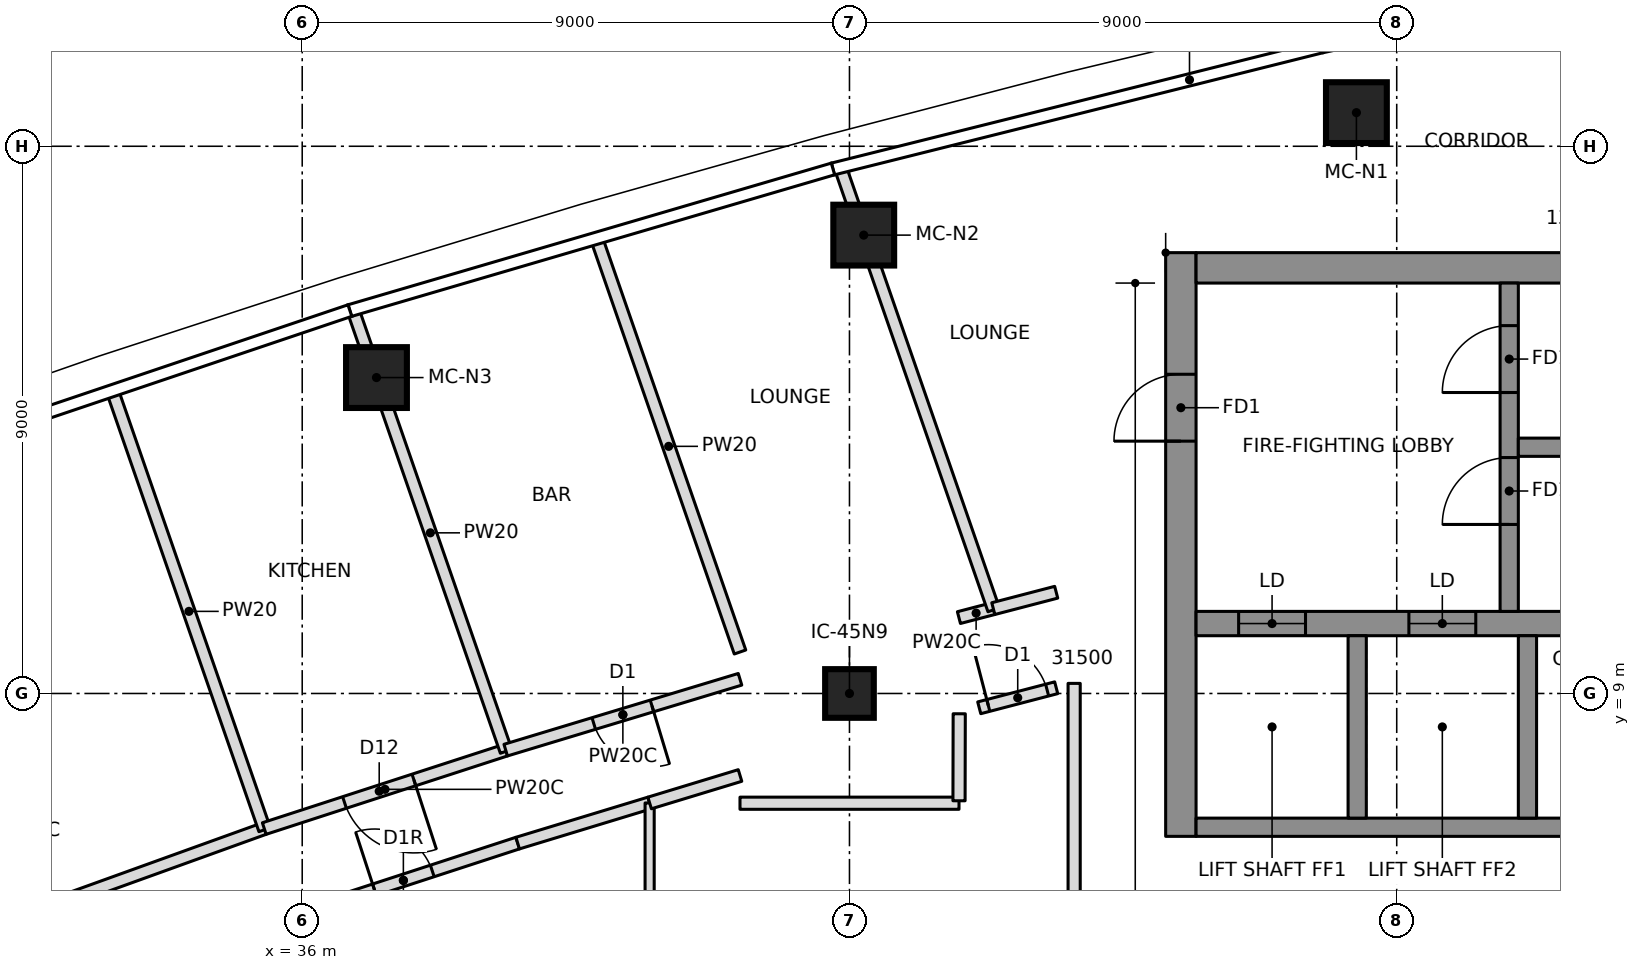
"""IFC4 building model, lengths in metres.
Left out: names, types, materials, properties, quantities, classifications, styles, units other than length and angle.
Written with IfcOpenShell. Run it as: python <this file> out.ifc"""

import sys

from ifc_helpers import new_model, si_unit, direction, frame, frame_2d, origin, origin_2d, place, context, subcontext, project, spatial, polyline, rectangle, outline, extrude, element, fill, save


model = new_model("IFC4")
c1 = context("Model", 3, precision=1e-05, world=origin(), true_north=direction((0.0, 1.0)))
c2 = subcontext(c1, "Body", "Model", "MODEL_VIEW")
j1 = project(units=[si_unit("LENGTHUNIT", "METRE"), si_unit("PLANEANGLEUNIT", "RADIAN")], contexts=[c1])
p1 = place(None, origin())
s1 = spatial("IfcSite", under=j1, at=p1, CompositionType="ELEMENT")
p2 = place(p1, origin())
s2 = spatial("IfcBuilding", under=s1, at=p2, CompositionType="ELEMENT")
p3 = place(p2, frame((0.0, 0.0, 313.2)))
s3 = spatial("IfcBuildingStorey", under=s2, at=p3, CompositionType="ELEMENT", Elevation=313.2)
p4 = place(p3, frame((50.45, 6.65, 0.0), z_axis=(0.0, 0.0, 1.0), x_axis=(0.0, 1.0, 0.0)))
e1 = element("IfcWall", 1, at=p4, inside=s3, PredefinedType="SHEAR", context=c2, shape_type="SweptSolid", body=[
    extrude(rectangle(XDim=9.6, YDim=0.5, at=frame_2d((4.8, 0.0))), origin(), (0.0, 0.0, 1.0), 5.4),
])
p5 = place(p4, frame((6.5, 0.0, 0.0)))
e2 = element("IfcOpeningElement", 2, at=p5, cuts=e1, PredefinedType="OPENING", context=c2, shape_type="SweptSolid", body=[
    extrude(rectangle(XDim=1.1, YDim=2.1, at=frame_2d((0.55, 1.05))), frame((0.0, 0.26, 0.0), z_axis=(0.0, -1.0, 0.0), x_axis=(1.0, 0.0, 0.0)), (0.0, 0.0, 1.0), 0.52),
])
p6 = place(p3, frame((50.7, 16.0, 0.0), z_axis=(0.0, 0.0, 1.0), x_axis=(1.0, 0.0, 0.0)))
e3 = element("IfcWall", 3, at=p6, inside=s3, PredefinedType="SHEAR", context=c2, shape_type="SweptSolid", body=[
    extrude(rectangle(XDim=13.52, YDim=0.5, at=frame_2d((6.76, 0.0))), origin(), (0.0, 0.0, 1.0), 5.4),
])
p7 = place(p3, frame((50.7, 10.15, 0.0), z_axis=(0.0, 0.0, 1.0), x_axis=(1.0, 0.0, 0.0)))
e4 = element("IfcWall", 4, at=p7, inside=s3, PredefinedType="SHEAR", context=c2, shape_type="SweptSolid", body=[
    extrude(rectangle(XDim=13.02, YDim=0.4, at=frame_2d((6.51, 0.0))), origin(), (0.0, 0.0, 1.0), 5.4),
])
p8 = place(p7, frame((0.7, 0.0, 0.0)))
e5 = element("IfcOpeningElement", 5, at=p8, cuts=e4, PredefinedType="OPENING", context=c2, shape_type="SweptSolid", body=[
    extrude(rectangle(XDim=1.1, YDim=2.1, at=frame_2d((0.55, 1.05))), frame((0.0, 0.21, 0.0), z_axis=(0.0, -1.0, 0.0), x_axis=(1.0, 0.0, 0.0)), (0.0, 0.0, 1.0), 0.42),
])
p9 = place(p7, frame((3.5, 0.0, 0.0)))
e6 = element("IfcOpeningElement", 6, at=p9, cuts=e4, PredefinedType="OPENING", context=c2, shape_type="SweptSolid", body=[
    extrude(rectangle(XDim=1.1, YDim=2.1, at=frame_2d((0.55, 1.05))), frame((0.0, 0.21, 0.0), z_axis=(0.0, -1.0, 0.0), x_axis=(1.0, 0.0, 0.0)), (0.0, 0.0, 1.0), 0.42),
])
p10 = place(p3, frame((50.7, 6.8, 0.0), z_axis=(0.0, 0.0, 1.0), x_axis=(1.0, 0.0, 0.0)))
e7 = element("IfcWall", 7, at=p10, inside=s3, PredefinedType="SHEAR", context=c2, shape_type="SweptSolid", body=[
    extrude(rectangle(XDim=10.9, YDim=0.3, at=frame_2d((5.45, 0.0))), origin(), (0.0, 0.0, 1.0), 5.4),
])
p11 = place(p10, frame((6.4, 0.0, 0.0)))
e8 = element("IfcOpeningElement", 8, at=p11, cuts=e7, PredefinedType="OPENING", context=c2, shape_type="SweptSolid", body=[
    extrude(rectangle(XDim=0.9, YDim=2.1, at=frame_2d((0.45, 1.05))), frame((0.0, 0.16, 0.0), z_axis=(0.0, -1.0, 0.0), x_axis=(1.0, 0.0, 0.0)), (0.0, 0.0, 1.0), 0.32),
])
p12 = place(p10, frame((9.2, 0.0, 0.0)))
e9 = element("IfcOpeningElement", 9, at=p12, cuts=e7, PredefinedType="OPENING", context=c2, shape_type="SweptSolid", body=[
    extrude(rectangle(XDim=0.9, YDim=2.1, at=frame_2d((0.45, 1.05))), frame((0.0, 0.16, 0.0), z_axis=(0.0, -1.0, 0.0), x_axis=(1.0, 0.0, 0.0)), (0.0, 0.0, 1.0), 0.32),
])
for number, where, z_axis, x_axis in (
    (10, (53.35, 6.95, 0.0), (0.0, 0.0, 1.0), (0.0, 1.0, 0.0)),
    (11, (56.15, 6.95, 0.0), (0.0, 0.0, 1.0), (0.0, 1.0, 0.0)),
):
    element("IfcWall", number, at=place(p3, frame(where, z_axis=z_axis, x_axis=x_axis)), inside=s3, PredefinedType="SHEAR", context=c2, shape_type="SweptSolid", body=[
        extrude(rectangle(XDim=3.0, YDim=0.3, at=frame_2d((1.5, 0.0))), origin(), (0.0, 0.0, 1.0), 5.4),
    ])
p13 = place(p3, frame((55.85, 10.35, 0.0), z_axis=(0.0, 0.0, 1.0), x_axis=(0.0, 1.0, 0.0)))
e12 = element("IfcWall", 12, at=p13, inside=s3, PredefinedType="SHEAR", context=c2, shape_type="SweptSolid", body=[
    extrude(rectangle(XDim=5.4, YDim=0.3, at=frame_2d((2.7, 0.0))), origin(), (0.0, 0.0, 1.0), 5.4),
])
p14 = place(p13, frame((1.43, 0.0, 0.0)))
e13 = element("IfcOpeningElement", 13, at=p14, cuts=e12, PredefinedType="OPENING", context=c2, shape_type="SweptSolid", body=[
    extrude(rectangle(XDim=1.1, YDim=2.1, at=frame_2d((0.55, 1.05))), frame((0.0, 0.16, 0.0), z_axis=(0.0, -1.0, 0.0), x_axis=(1.0, 0.0, 0.0)), (0.0, 0.0, 1.0), 0.32),
])
p15 = place(p13, frame((3.6, 0.0, 0.0)))
e14 = element("IfcOpeningElement", 14, at=p15, cuts=e12, PredefinedType="OPENING", context=c2, shape_type="SweptSolid", body=[
    extrude(rectangle(XDim=1.1, YDim=2.1, at=frame_2d((0.55, 1.05))), frame((0.0, 0.16, 0.0), z_axis=(0.0, -1.0, 0.0), x_axis=(1.0, 0.0, 0.0)), (0.0, 0.0, 1.0), 0.32),
])
p16 = place(p3, frame((56.0, 13.05, 0.0), z_axis=(0.0, 0.0, 1.0), x_axis=(1.0, 0.0, 0.0)))
e15 = element("IfcWall", 15, at=p16, inside=s3, PredefinedType="SHEAR", context=c2, shape_type="SweptSolid", body=[
    extrude(rectangle(XDim=7.72, YDim=0.3, at=frame_2d((3.86, 0.0))), origin(), (0.0, 0.0, 1.0), 5.4),
])
for number, where, z_axis, x_axis in (
    (16, (53.337, 18.553, 0.0), (0.0, 0.0, 1.0), (1.0, 0.0, 0.0)),
    (17, (45.235, 16.539, 0.0), (0.0, 0.0, 1.0), (1.0, 0.0, 0.0)),
    (18, (37.221, 14.196, 0.0), (0.0, 0.0, 1.0), (1.0, 0.0, 0.0)),
):
    element("IfcColumn", number, at=place(p3, frame(where, z_axis=z_axis, x_axis=x_axis)), inside=s3, PredefinedType="COLUMN", context=c2, shape_type="SweptSolid", body=[
        extrude(rectangle(XDim=1.0, YDim=1.0, at=origin_2d()), origin(), (0.0, 0.0, 1.0), 5.4),
    ])
p17 = place(p3, frame((45.0, 9.0, 0.0), z_axis=(0.0, 0.0, 1.0), x_axis=(1.0, 0.0, 0.0)))
e19 = element("IfcColumn", 19, at=p17, inside=s3, PredefinedType="COLUMN", context=c2, shape_type="SweptSolid", body=[
    extrude(rectangle(XDim=0.8, YDim=0.8, at=origin_2d()), origin(), (0.0, 0.0, 1.0), 5.4),
])
p18 = place(p3, frame((56.785, 20.615, 0.0), z_axis=(0.0, 0.0, 1.0), x_axis=(-0.977020225348, -0.213146614471, 0.0)))
e20 = element("IfcWall", 20, at=p18, inside=s3, PredefinedType="NOTDEFINED", context=c2, shape_type="SweptSolid", body=[
    extrude(outline(polyline([(-0.029, -0.2), (4.142, -0.2), (4.142, 0.2), (0.029, 0.2), (-0.029, -0.2)])), origin(), (0.0, 0.0, 1.0), 5.1),
])
p19 = place(p18, frame((0.871, 0.0, 0.3)))
e21 = element("IfcOpeningElement", 21, at=p19, cuts=e20, PredefinedType="OPENING", context=c2, shape_type="SweptSolid", body=[
    extrude(rectangle(XDim=2.4, YDim=3.0, at=frame_2d((1.2, 1.5))), frame((0.0, 0.21, 0.0), z_axis=(0.0, -1.0, 0.0), x_axis=(1.0, 0.0, 0.0)), (0.0, 0.0, 1.0), 0.42),
])
p20 = place(p3, frame((35.376, 6.779, 0.0), z_axis=(0.0, 0.0, 1.0), x_axis=(-0.940653782276, -0.339367738433, 0.0)))
e22 = element("IfcWall", 22, at=p20, inside=s3, PredefinedType="PARTITIONING", context=c2, shape_type="SweptSolid", body=[
    extrude(rectangle(XDim=8.347, YDim=0.2, at=frame_2d((4.174, 0.0))), origin(), (0.0, 0.0, 1.0), 5.1),
])
p21 = place(p20, frame((3.674, 0.0, 0.0)))
e23 = element("IfcOpeningElement", 23, at=p21, cuts=e22, PredefinedType="OPENING", context=c2, shape_type="SweptSolid", body=[
    extrude(rectangle(XDim=2.0, YDim=2.4, at=frame_2d((1.0, 1.2))), frame((0.0, 0.11, 0.0), z_axis=(0.0, -1.0, 0.0), x_axis=(1.0, 0.0, 0.0)), (0.0, 0.0, 1.0), 0.22),
])
p22 = place(p3, frame((35.382, 6.76, 0.0), z_axis=(0.0, 0.0, 1.0), x_axis=(-0.327699570064, 0.944781981083, 0.0)))
e24 = element("IfcWall", 24, at=p22, inside=s3, PredefinedType="PARTITIONING", context=c2, shape_type="SweptSolid", body=[
    extrude(rectangle(XDim=7.601, YDim=0.2, at=frame_2d((3.801, 0.0))), origin(), (0.0, 0.0, 1.0), 5.1),
])
p23 = place(p3, frame((39.347, 8.068, 0.0), z_axis=(0.0, 0.0, 1.0), x_axis=(-0.951104948213, -0.308867896493, 0.0)))
e25 = element("IfcWall", 25, at=p23, inside=s3, PredefinedType="PARTITIONING", context=c2, shape_type="SweptSolid", body=[
    extrude(rectangle(XDim=4.175, YDim=0.2, at=frame_2d((2.087, 0.0))), origin(), (0.0, 0.0, 1.0), 5.1),
])
p24 = place(p23, frame((1.588, 0.0, 0.0)))
e26 = element("IfcOpeningElement", 26, at=p24, cuts=e25, PredefinedType="OPENING", context=c2, shape_type="SweptSolid", body=[
    extrude(rectangle(XDim=1.2, YDim=2.1, at=frame_2d((0.6, 1.05))), frame((0.0, 0.11, 0.0), z_axis=(0.0, -1.0, 0.0), x_axis=(1.0, 0.0, 0.0)), (0.0, 0.0, 1.0), 0.22),
])
p25 = place(p3, frame((39.354, 8.049, 0.0), z_axis=(0.0, 0.0, 1.0), x_axis=(-0.327741126954, 0.944767565967, 0.0)))
e27 = element("IfcWall", 27, at=p25, inside=s3, PredefinedType="PARTITIONING", context=c2, shape_type="SweptSolid", body=[
    extrude(rectangle(XDim=7.606, YDim=0.2, at=frame_2d((3.803, 0.0))), origin(), (0.0, 0.0, 1.0), 5.1),
])
p26 = place(p3, frame((43.2, 9.233, 0.0), z_axis=(0.0, 0.0, 1.0), x_axis=(-0.957187982889, -0.289467036833, 0.0)))
e28 = element("IfcWall", 28, at=p26, inside=s3, PredefinedType="PARTITIONING", context=c2, shape_type="SweptSolid", body=[
    extrude(rectangle(XDim=4.026, YDim=0.2, at=frame_2d((2.013, 0.0))), origin(), (0.0, 0.0, 1.0), 5.1),
])
p27 = place(p26, frame((1.513, 0.0, 0.0)))
e29 = element("IfcOpeningElement", 29, at=p27, cuts=e28, PredefinedType="OPENING", context=c2, shape_type="SweptSolid", body=[
    extrude(rectangle(XDim=1.0, YDim=2.1, at=frame_2d((0.5, 1.05))), frame((0.0, 0.11, 0.0), z_axis=(0.0, -1.0, 0.0), x_axis=(1.0, 0.0, 0.0)), (0.0, 0.0, 1.0), 0.22),
])
p28 = place(p3, frame((43.2, 9.682, 0.0), z_axis=(0.0, 0.0, 1.0), x_axis=(-0.327701896972, 0.944781173987, 0.0)))
e30 = element("IfcWall", 30, at=p28, inside=s3, PredefinedType="PARTITIONING", context=c2, shape_type="SweptSolid", body=[
    extrude(rectangle(XDim=7.16, YDim=0.2, at=frame_2d((3.58, 0.0))), origin(), (0.0, 0.0, 1.0), 5.1),
])
p29 = place(p3, frame((47.365, 10.396, 0.0), z_axis=(0.0, 0.0, 1.0), x_axis=(-0.967635017449, -0.252353864654, 0.0)))
e31 = element("IfcWall", 31, at=p29, inside=s3, PredefinedType="PARTITIONING", context=c2, shape_type="SweptSolid", body=[
    extrude(rectangle(XDim=0.584, YDim=0.2, at=frame_2d((0.292, 0.0))), origin(), (0.0, 0.0, 1.0), 5.1),
])
p30 = place(p3, frame((47.372, 10.376, 0.0), z_axis=(0.0, 0.0, 1.0), x_axis=(-0.327733034973, 0.944770373047, 0.0)))
e32 = element("IfcWall", 32, at=p30, inside=s3, PredefinedType="PARTITIONING", context=c2, shape_type="SweptSolid", body=[
    extrude(rectangle(XDim=7.624, YDim=0.2, at=frame_2d((3.812, 0.0))), origin(), (0.0, 0.0, 1.0), 5.1),
])
p31 = place(p3, frame((35.783, 5.313, 0.0), z_axis=(0.0, 0.0, 1.0), x_axis=(0.950700567571, 0.310110352648, 0.0)))
e33 = element("IfcWall", 33, at=p31, inside=s3, PredefinedType="PARTITIONING", context=c2, shape_type="SweptSolid", body=[
    extrude(rectangle(XDim=3.955, YDim=0.2, at=frame_2d((1.978, 0.0))), origin(), (0.0, 0.0, 1.0), 5.1),
])
p32 = place(p31, frame((1.478, 0.0, 0.0)))
e34 = element("IfcOpeningElement", 34, at=p32, cuts=e33, PredefinedType="OPENING", context=c2, shape_type="SweptSolid", body=[
    extrude(rectangle(XDim=1.0, YDim=2.1, at=frame_2d((0.5, 1.05))), frame((0.0, 0.11, 0.0), z_axis=(0.0, -1.0, 0.0), x_axis=(1.0, 0.0, 0.0)), (0.0, 0.0, 1.0), 0.22),
])
p33 = place(p3, frame((39.544, 6.539, 0.0), z_axis=(0.0, 0.0, 1.0), x_axis=(0.956735130354, 0.290960289981, 0.0)))
e35 = element("IfcWall", 35, at=p33, inside=s3, PredefinedType="PARTITIONING", context=c2, shape_type="SweptSolid", body=[
    extrude(rectangle(XDim=2.268, YDim=0.2, at=frame_2d((1.134, 0.0))), origin(), (0.0, 0.0, 1.0), 5.1),
])
p34 = place(p3, frame((41.714, -7.199, 0.0), z_axis=(0.0, 0.0, 1.0), x_axis=(0.0, 1.0, 0.0)))
e36 = element("IfcWall", 36, at=p34, inside=s3, PredefinedType="PARTITIONING", context=c2, shape_type="SweptSolid", body=[
    extrude(rectangle(XDim=14.398, YDim=0.15, at=frame_2d((7.199, 0.0))), origin(), (0.0, 0.0, 1.0), 5.1),
])
p35 = place(p3, frame((41.714, 7.199, 0.0), z_axis=(0.0, 0.0, 1.0), x_axis=(0.956755682532, 0.290892701769, 0.0)))
e37 = element("IfcWall", 37, at=p35, inside=s3, PredefinedType="PARTITIONING", context=c2, shape_type="SweptSolid", body=[
    extrude(rectangle(XDim=1.553, YDim=0.2, at=frame_2d((0.777, 0.0))), origin(), (0.0, 0.0, 1.0), 5.1),
])
p36 = place(p3, frame((48.4, 10.665, 0.0), z_axis=(0.0, 0.0, 1.0), x_axis=(-0.967689993731, -0.252142967448, 0.0)))
e38 = element("IfcWall", 38, at=p36, inside=s3, PredefinedType="PARTITIONING", context=c2, shape_type="SweptSolid", body=[
    extrude(rectangle(XDim=1.069, YDim=0.2, at=frame_2d((0.534, 0.0))), origin(), (0.0, 0.0, 1.0), 5.1),
])
p37 = place(p3, frame((47.134, 8.764, 0.0), z_axis=(0.0, 0.0, 1.0), x_axis=(0.967678694968, 0.252186326563, 0.0)))
e39 = element("IfcWall", 39, at=p37, inside=s3, PredefinedType="PARTITIONING", context=c2, shape_type="SweptSolid", body=[
    extrude(rectangle(XDim=1.308, YDim=0.2, at=frame_2d((0.654, 0.0))), origin(), (0.0, 0.0, 1.0), 5.1),
])
p38 = place(p37, frame((0.154, 0.0, 0.0)))
e40 = element("IfcOpeningElement", 40, at=p38, cuts=e39, PredefinedType="OPENING", context=c2, shape_type="SweptSolid", body=[
    extrude(rectangle(XDim=1.0, YDim=2.1, at=frame_2d((0.5, 1.05))), frame((0.0, 0.11, 0.0), z_axis=(0.0, -1.0, 0.0), x_axis=(1.0, 0.0, 0.0)), (0.0, 0.0, 1.0), 0.22),
])
p39 = place(p3, frame((43.199, 7.195, 0.0), z_axis=(0.0, 0.0, 1.0), x_axis=(0.999999997703, 6.7778229e-05, 0.0)))
e41 = element("IfcWall", 41, at=p39, inside=s3, PredefinedType="PARTITIONING", context=c2, shape_type="SweptSolid", body=[
    extrude(rectangle(XDim=3.602, YDim=0.2, at=frame_2d((1.801, 0.0))), origin(), (0.0, 0.0, 1.0), 5.1),
])
p40 = place(p3, frame((46.802, 7.235, 0.0), z_axis=(0.0, 0.0, 1.0), x_axis=(0.00238825658, 0.999997148111, 0.0)))
e42 = element("IfcWall", 42, at=p40, inside=s3, PredefinedType="PARTITIONING", context=c2, shape_type="SweptSolid", body=[
    extrude(rectangle(XDim=1.431, YDim=0.2, at=frame_2d((0.716, 0.0))), origin(), (0.0, 0.0, 1.0), 5.1),
])
p41 = place(p3, frame((48.695, 9.166, 0.0), z_axis=(0.0, 0.0, 1.0), x_axis=(0.0, -1.0, 0.0)))
e43 = element("IfcWall", 43, at=p41, inside=s3, PredefinedType="PARTITIONING", context=c2, shape_type="SweptSolid", body=[
    extrude(rectangle(XDim=18.332, YDim=0.2, at=frame_2d((9.166, 0.0))), origin(), (0.0, 0.0, 1.0), 5.1),
])
p42 = place(p24, origin())
e44 = element("IfcDoor", 44, at=p42, inside=s3, OperationType="SINGLE_SWING_RIGHT", PredefinedType="DOOR", context=c2, shape_type="SweptSolid", body=[
    extrude(rectangle(XDim=1.2, YDim=2.1, at=frame_2d((0.6, 1.05))), frame((0.0, 0.025, 0.0), z_axis=(0.0, -1.0, 0.0), x_axis=(1.0, 0.0, 0.0)), (0.0, 0.0, 1.0), 0.05),
])
fill(e26, e44)
p43 = place(p27, origin())
e45 = element("IfcDoor", 45, at=p43, inside=s3, OperationType="SINGLE_SWING_LEFT", PredefinedType="DOOR", context=c2, shape_type="SweptSolid", body=[
    extrude(rectangle(XDim=1.0, YDim=2.1, at=frame_2d((0.5, 1.05))), frame((0.0, 0.025, 0.0), z_axis=(0.0, -1.0, 0.0), x_axis=(1.0, 0.0, 0.0)), (0.0, 0.0, 1.0), 0.05),
])
fill(e29, e45)
p44 = place(p32, origin())
e46 = element("IfcDoor", 46, at=p44, inside=s3, OperationType="SINGLE_SWING_RIGHT", PredefinedType="DOOR", context=c2, shape_type="SweptSolid", body=[
    extrude(rectangle(XDim=1.0, YDim=2.1, at=frame_2d((0.5, 1.05))), frame((0.0, 0.025, 0.0), z_axis=(0.0, -1.0, 0.0), x_axis=(1.0, 0.0, 0.0)), (0.0, 0.0, 1.0), 0.05),
])
fill(e34, e46)
p45 = place(p38, origin())
e47 = element("IfcDoor", 47, at=p45, inside=s3, OperationType="SINGLE_SWING_LEFT", PredefinedType="DOOR", context=c2, shape_type="SweptSolid", body=[
    extrude(rectangle(XDim=1.0, YDim=2.1, at=frame_2d((0.5, 1.05))), frame((0.0, 0.025, 0.0), z_axis=(0.0, -1.0, 0.0), x_axis=(1.0, 0.0, 0.0)), (0.0, 0.0, 1.0), 0.05),
])
fill(e40, e47)
p46 = place(p8, origin())
e48 = element("IfcDoor", 48, at=p46, inside=s3, OperationType="DOUBLE_DOOR_SLIDING", PredefinedType="DOOR", context=c2, shape_type="SweptSolid", body=[
    extrude(rectangle(XDim=1.1, YDim=2.1, at=frame_2d((0.55, 1.05))), frame((0.0, 0.025, 0.0), z_axis=(0.0, -1.0, 0.0), x_axis=(1.0, 0.0, 0.0)), (0.0, 0.0, 1.0), 0.05),
])
fill(e5, e48)
p47 = place(p9, origin())
e49 = element("IfcDoor", 49, at=p47, inside=s3, OperationType="DOUBLE_DOOR_SLIDING", PredefinedType="DOOR", context=c2, shape_type="SweptSolid", body=[
    extrude(rectangle(XDim=1.1, YDim=2.1, at=frame_2d((0.55, 1.05))), frame((0.0, 0.025, 0.0), z_axis=(0.0, -1.0, 0.0), x_axis=(1.0, 0.0, 0.0)), (0.0, 0.0, 1.0), 0.05),
])
fill(e6, e49)
p48 = place(p14, origin())
e50 = element("IfcDoor", 50, at=p48, inside=s3, OperationType="SINGLE_SWING_RIGHT", PredefinedType="DOOR", context=c2, shape_type="SweptSolid", body=[
    extrude(rectangle(XDim=1.1, YDim=2.1, at=frame_2d((0.55, 1.05))), frame((0.0, 0.025, 0.0), z_axis=(0.0, -1.0, 0.0), x_axis=(1.0, 0.0, 0.0)), (0.0, 0.0, 1.0), 0.05),
])
fill(e13, e50)
p49 = place(p15, origin())
e51 = element("IfcDoor", 51, at=p49, inside=s3, OperationType="SINGLE_SWING_RIGHT", PredefinedType="DOOR", context=c2, shape_type="SweptSolid", body=[
    extrude(rectangle(XDim=1.1, YDim=2.1, at=frame_2d((0.55, 1.05))), frame((0.0, 0.025, 0.0), z_axis=(0.0, -1.0, 0.0), x_axis=(1.0, 0.0, 0.0)), (0.0, 0.0, 1.0), 0.05),
])
fill(e14, e51)
p50 = place(p5, origin())
e52 = element("IfcDoor", 52, at=p50, inside=s3, OperationType="SINGLE_SWING_RIGHT", PredefinedType="DOOR", context=c2, shape_type="SweptSolid", body=[
    extrude(rectangle(XDim=1.1, YDim=2.1, at=frame_2d((0.55, 1.05))), frame((0.0, 0.025, 0.0), z_axis=(0.0, -1.0, 0.0), x_axis=(1.0, 0.0, 0.0)), (0.0, 0.0, 1.0), 0.05),
])
fill(e2, e52)
save(model, sys.argv[1])
